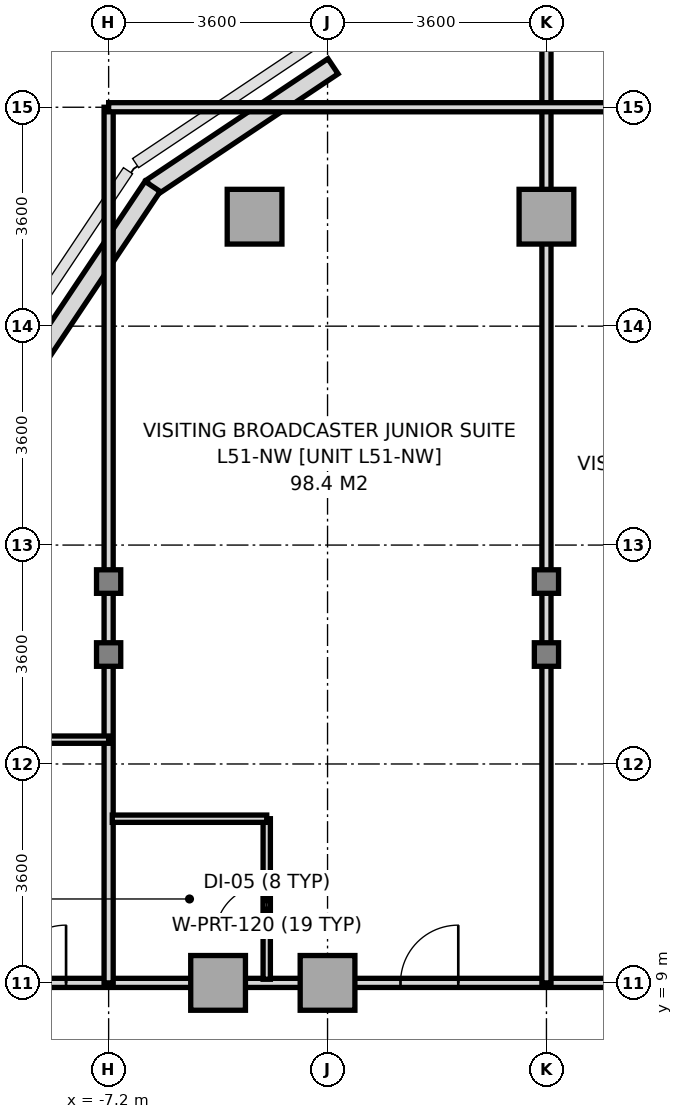
"""IFC4 building model, lengths in metres.
Left out: names, types, materials, properties, quantities, classifications, styles, units other than length and angle.
Written with IfcOpenShell. Run it as: python <this file> out.ifc"""

import sys

from ifc_helpers import new_model, si_unit, direction, frame, frame_2d, origin, origin_2d, place, context, subcontext, project, spatial, rectangle, i_section, extrude, source, transform, mapped, element, fill, save


model = new_model("IFC4")
c1 = context("Model", 3, precision=1e-05, world=origin(), true_north=direction((0.0, 1.0)))
c2 = subcontext(c1, "Body", "Model", "MODEL_VIEW")
j1 = project(units=[si_unit("LENGTHUNIT", "METRE"), si_unit("PLANEANGLEUNIT", "RADIAN")], contexts=[c1])
p1 = place(None, origin())
s1 = spatial("IfcSite", under=j1, at=p1, CompositionType="ELEMENT")
p2 = place(p1, origin())
s2 = spatial("IfcBuilding", under=s1, at=p2, CompositionType="ELEMENT")
p3 = place(p2, frame((0.0, 0.0, 187.6)))
s3 = spatial("IfcBuildingStorey", under=s2, at=p3, CompositionType="ELEMENT", Elevation=187.6)
m1 = source(origin(), c2, "Body", "SweptSolid", [
    extrude(i_section(OverallWidth=0.398, OverallDepth=0.387, WebThickness=0.018, FlangeThickness=0.028, at=origin_2d()), origin(), (0.0, 0.0, 1.0), 3.2),
])
for number, where, z_axis, x_axis in (
    (1, (-7.2, 14.4, 0.0), (0.0, 0.0, 1.0), (1.0, 0.0, 0.0)),
    (2, (-7.2, 15.6, 0.0), (0.0, 0.0, 1.0), (1.0, 0.0, 0.0)),
):
    element("IfcColumn", number, at=place(p3, frame(where, z_axis=z_axis, x_axis=x_axis)), inside=s3, PredefinedType="COLUMN", context=c2, shape_type="MappedRepresentation", body=[
        mapped(m1, transform((0.0, 0.0, 0.0), x_axis=(1.0, 0.0, 0.0), y_axis=(0.0, 1.0, 0.0), z_axis=(0.0, 0.0, 1.0), scale=1.0)),
    ])
m2 = source(origin(), c2, "Body", "SweptSolid", [
    extrude(rectangle(XDim=0.9, YDim=0.9, at=origin_2d()), origin(), (0.0, 0.0, 1.0), 3.2),
])
for number, where, z_axis, x_axis in (
    (3, (-5.4, 9.0, 0.0), (0.0, 0.0, 1.0), (1.0, 0.0, 0.0)),
    (4, (-4.8, 21.6, 0.0), (0.0, 0.0, 1.0), (1.0, 0.0, 0.0)),
    (5, (-3.6, 9.0, 0.0), (0.0, 0.0, 1.0), (1.0, 0.0, 0.0)),
):
    element("IfcColumn", number, at=place(p3, frame(where, z_axis=z_axis, x_axis=x_axis)), inside=s3, PredefinedType="COLUMN", context=c2, shape_type="MappedRepresentation", body=[
        mapped(m2, transform((0.0, 0.0, 0.0), x_axis=(1.0, 0.0, 0.0), y_axis=(0.0, 1.0, 0.0), z_axis=(0.0, 0.0, 1.0), scale=1.0)),
    ])
for number, where, z_axis, x_axis in (
    (6, (0.0, 14.4, 0.0), (0.0, 0.0, 1.0), (1.0, 0.0, 0.0)),
    (7, (0.0, 15.6, 0.0), (0.0, 0.0, 1.0), (1.0, 0.0, 0.0)),
):
    element("IfcColumn", number, at=place(p3, frame(where, z_axis=z_axis, x_axis=x_axis)), inside=s3, PredefinedType="COLUMN", context=c2, shape_type="MappedRepresentation", body=[
        mapped(m1, transform((0.0, 0.0, 0.0), x_axis=(1.0, 0.0, 0.0), y_axis=(0.0, 1.0, 0.0), z_axis=(0.0, 0.0, 1.0), scale=1.0)),
    ])
p4 = place(p3, frame((0.0, 21.6, 0.0), z_axis=(0.0, 0.0, 1.0), x_axis=(1.0, 0.0, 0.0)))
e8 = element("IfcColumn", 8, at=p4, inside=s3, PredefinedType="COLUMN", context=c2, shape_type="MappedRepresentation", body=[
    mapped(m2, transform((0.0, 0.0, 0.0), x_axis=(1.0, 0.0, 0.0), y_axis=(0.0, 1.0, 0.0), z_axis=(0.0, 0.0, 1.0), scale=1.0)),
])
p5 = place(p3, frame((-3.51, 24.073, 0.0), z_axis=(0.0, 0.0, 1.0), x_axis=(-0.8314749531, -0.555562239868, 0.0)))
e9 = element("IfcWall", 9, at=p5, inside=s3, PredefinedType="SOLIDWALL", context=c2, shape_type="SweptSolid", body=[
    extrude(rectangle(XDim=3.593, YDim=0.3, at=frame_2d((1.797, 0.0))), origin(), (0.0, 0.0, 1.0), 3.2),
])
p6 = place(p3, frame((-6.477, 22.098, 0.0), z_axis=(0.0, 0.0, 1.0), x_axis=(-0.555574187116, -0.831466970246, 0.0)))
e10 = element("IfcWall", 10, at=p6, inside=s3, PredefinedType="SOLIDWALL", context=c2, shape_type="SweptSolid", body=[
    extrude(rectangle(XDim=3.609, YDim=0.3, at=frame_2d((1.804, 0.0))), origin(), (0.0, 0.0, 1.0), 3.2),
])
p7 = place(p3, frame((-9.55, 9.0, 0.0), z_axis=(0.0, 0.0, 1.0), x_axis=(1.0, 0.0, 0.0)))
e11 = element("IfcWall", 11, at=p7, inside=s3, PredefinedType="PARTITIONING", context=c2, shape_type="SweptSolid", body=[
    extrude(rectangle(XDim=19.1, YDim=0.15, at=frame_2d((9.55, 0.0))), origin(), (0.0, 0.0, 1.0), 2.75),
])
p8 = place(p7, frame((0.7, 0.0, 0.0)))
e12 = element("IfcOpeningElement", 12, at=p8, cuts=e11, PredefinedType="OPENING", context=c2, shape_type="SweptSolid", body=[
    extrude(rectangle(XDim=0.95, YDim=2.15, at=frame_2d((0.475, 1.075))), frame((0.0, 0.085, 0.0), z_axis=(0.0, -1.0, 0.0), x_axis=(1.0, 0.0, 0.0)), (0.0, 0.0, 1.0), 0.17),
])
p9 = place(p7, frame((7.15, 0.0, 0.0)))
e13 = element("IfcOpeningElement", 13, at=p9, cuts=e11, PredefinedType="OPENING", context=c2, shape_type="SweptSolid", body=[
    extrude(rectangle(XDim=0.95, YDim=2.15, at=frame_2d((0.475, 1.075))), frame((0.0, 0.085, 0.0), z_axis=(0.0, -1.0, 0.0), x_axis=(1.0, 0.0, 0.0)), (0.0, 0.0, 1.0), 0.17),
])
p10 = place(p7, frame((11.55, 0.0, 0.0)))
e14 = element("IfcOpeningElement", 14, at=p10, cuts=e11, PredefinedType="OPENING", context=c2, shape_type="SweptSolid", body=[
    extrude(rectangle(XDim=0.95, YDim=2.15, at=frame_2d((0.475, 1.075))), frame((0.0, 0.085, 0.0), z_axis=(0.0, -1.0, 0.0), x_axis=(1.0, 0.0, 0.0)), (0.0, 0.0, 1.0), 0.17),
])
p11 = place(p3, frame((-7.2, 9.0, 0.0), z_axis=(0.0, 0.0, 1.0), x_axis=(0.0, 1.0, 0.0)))
e15 = element("IfcWall", 15, at=p11, inside=s3, PredefinedType="PARTITIONING", context=c2, shape_type="SweptSolid", body=[
    extrude(rectangle(XDim=14.4, YDim=0.15, at=frame_2d((7.2, 0.0))), origin(), (0.0, 0.0, 1.0), 2.75),
])
p12 = place(p3, frame((0.0, 9.0, 0.0), z_axis=(0.0, 0.0, 1.0), x_axis=(0.0, 1.0, 0.0)))
e16 = element("IfcWall", 16, at=p12, inside=s3, PredefinedType="PARTITIONING", context=c2, shape_type="SweptSolid", body=[
    extrude(rectangle(XDim=15.65, YDim=0.15, at=frame_2d((7.825, 0.0))), origin(), (0.0, 0.0, 1.0), 2.75),
])
p13 = place(p3, frame((-7.2, 23.4, 0.0), z_axis=(0.0, 0.0, 1.0), x_axis=(1.0, 0.0, 0.0)))
e17 = element("IfcWall", 17, at=p13, inside=s3, PredefinedType="PARTITIONING", context=c2, shape_type="SweptSolid", body=[
    extrude(rectangle(XDim=14.4, YDim=0.15, at=frame_2d((7.2, 0.0))), origin(), (0.0, 0.0, 1.0), 3.2),
])
p14 = place(p3, frame((-9.45, 13.0, 0.0), z_axis=(0.0, 0.0, 1.0), x_axis=(1.0, 0.0, 0.0)))
e18 = element("IfcWall", 18, at=p14, inside=s3, PredefinedType="PARTITIONING", context=c2, shape_type="SweptSolid", body=[
    extrude(rectangle(XDim=2.25, YDim=0.12, at=frame_2d((1.125, 0.0))), origin(), (0.0, 0.0, 1.0), 3.2),
])
p15 = place(p3, frame((-4.6, 9.06, 0.0), z_axis=(0.0, 0.0, 1.0), x_axis=(0.0, 1.0, 0.0)))
e19 = element("IfcWall", 19, at=p15, inside=s3, PredefinedType="PARTITIONING", context=c2, shape_type="SweptSolid", body=[
    extrude(rectangle(XDim=2.64, YDim=0.12, at=frame_2d((1.32, 0.0))), origin(), (0.0, 0.0, 1.0), 3.2),
])
p16 = place(p15, frame((0.7, 0.0, 0.0)))
e20 = element("IfcOpeningElement", 20, at=p16, cuts=e19, PredefinedType="OPENING", context=c2, shape_type="SweptSolid", body=[
    extrude(rectangle(XDim=0.85, YDim=2.1, at=frame_2d((0.425, 1.05))), frame((0.0, 0.07, 0.0), z_axis=(0.0, -1.0, 0.0), x_axis=(1.0, 0.0, 0.0)), (0.0, 0.0, 1.0), 0.14),
])
p17 = place(p3, frame((-7.14, 11.7, 0.0), z_axis=(0.0, 0.0, 1.0), x_axis=(1.0, 0.0, 0.0)))
e21 = element("IfcWall", 21, at=p17, inside=s3, PredefinedType="PARTITIONING", context=c2, shape_type="SweptSolid", body=[
    extrude(rectangle(XDim=2.54, YDim=0.12, at=frame_2d((1.27, 0.0))), origin(), (0.0, 0.0, 1.0), 3.2),
])
m3 = source(origin(), c2, "Body", "SweptSolid", [
    extrude(rectangle(XDim=0.95, YDim=2.15, at=frame_2d((0.475, 1.075))), frame((0.0, 0.025, 0.0), z_axis=(0.0, -1.0, 0.0), x_axis=(1.0, 0.0, 0.0)), (0.0, 0.0, 1.0), 0.05),
])
p18 = place(p8, origin())
e22 = element("IfcDoor", 22, at=p18, inside=s3, OperationType="SINGLE_SWING_RIGHT", PredefinedType="DOOR", context=c2, shape_type="MappedRepresentation", body=[
    mapped(m3, transform((0.0, 0.0, 0.0), x_axis=(1.0, 0.0, 0.0), y_axis=(0.0, 1.0, 0.0), z_axis=(0.0, 0.0, 1.0), scale=1.0)),
])
fill(e12, e22)
m4 = source(origin(), c2, "Body", "SweptSolid", [
    extrude(rectangle(XDim=0.85, YDim=2.1, at=frame_2d((0.425, 1.05))), frame((0.0, 0.025, 0.0), z_axis=(0.0, -1.0, 0.0), x_axis=(1.0, 0.0, 0.0)), (0.0, 0.0, 1.0), 0.05),
])
p19 = place(p16, origin())
e23 = element("IfcDoor", 23, at=p19, inside=s3, OperationType="SINGLE_SWING_LEFT", PredefinedType="DOOR", context=c2, shape_type="MappedRepresentation", body=[
    mapped(m4, transform((0.0, 0.0, 0.0), x_axis=(1.0, 0.0, 0.0), y_axis=(0.0, 1.0, 0.0), z_axis=(0.0, 0.0, 1.0), scale=1.0)),
])
fill(e20, e23)
p20 = place(p9, origin())
e24 = element("IfcDoor", 24, at=p20, inside=s3, OperationType="SINGLE_SWING_RIGHT", PredefinedType="DOOR", context=c2, shape_type="MappedRepresentation", body=[
    mapped(m3, transform((0.0, 0.0, 0.0), x_axis=(1.0, 0.0, 0.0), y_axis=(0.0, 1.0, 0.0), z_axis=(0.0, 0.0, 1.0), scale=1.0)),
])
fill(e13, e24)
save(model, sys.argv[1])
